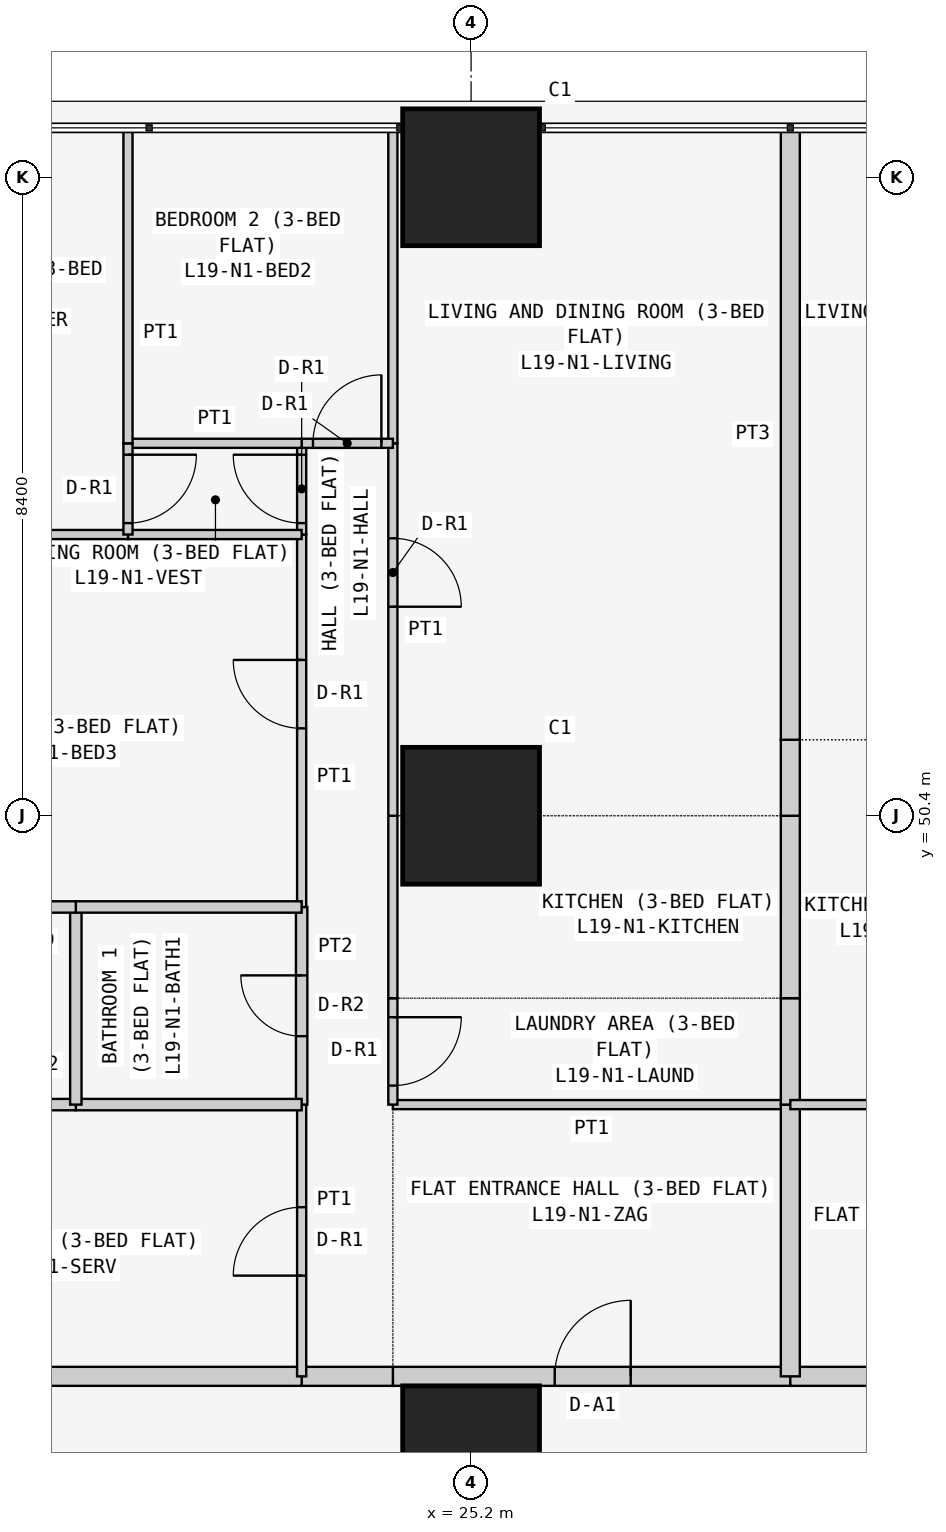
"""IFC4 building model, lengths in metres.
Left out: names, types, materials, properties, quantities, classifications, styles, units other than length and angle.
Written with IfcOpenShell. Run it as: python <this file> out.ifc"""

import sys

from ifc_helpers import new_model, si_unit, direction, frame, frame_2d, origin, origin_2d, place, context, subcontext, project, spatial, rectangle, extrude, element, fill, save


model = new_model("IFC4")
c1 = context("Model", 3, precision=1e-05, world=origin(), true_north=direction((0.0, 1.0)))
c2 = subcontext(c1, "Body", "Model", "MODEL_VIEW")
j1 = project(units=[si_unit("LENGTHUNIT", "METRE"), si_unit("PLANEANGLEUNIT", "RADIAN")], contexts=[c1])
p1 = place(None, origin())
s1 = spatial("IfcSite", under=j1, at=p1, CompositionType="ELEMENT")
p2 = place(p1, origin())
s2 = spatial("IfcBuilding", under=s1, at=p2, CompositionType="ELEMENT")
p3 = place(p2, frame((0.0, 0.0, 77.7)))
s3 = spatial("IfcBuildingStorey", under=s2, at=p3, CompositionType="ELEMENT", Elevation=77.7)
for number, where, z_axis, x_axis in (
    (1, (25.2, 42.0, 0.0), (0.0, 0.0, 1.0), (1.0, 0.0, 0.0)),
    (2, (25.2, 50.4, 0.0), (0.0, 0.0, 1.0), (1.0, 0.0, 0.0)),
    (3, (25.2, 58.8, 0.0), (0.0, 0.0, 1.0), (1.0, 0.0, 0.0)),
):
    element("IfcColumn", number, at=place(p3, frame(where, z_axis=z_axis, x_axis=x_axis)), inside=s3, PredefinedType="COLUMN", context=c2, shape_type="SweptSolid", body=[
        extrude(rectangle(XDim=1.8, YDim=1.8, at=origin_2d()), origin(), (0.0, 0.0, 1.0), 3.6),
    ])
p4 = place(p3, frame((24.171, 43.025, 0.0), z_axis=(0.0, 0.0, 1.0), x_axis=(1.0, 0.0, 0.0)))
e4 = element("IfcWall", 4, at=p4, inside=s3, PredefinedType="PARTITIONING", context=c2, shape_type="SweptSolid", body=[
    extrude(rectangle(XDim=5.229, YDim=0.25, at=frame_2d((2.615, 0.0))), origin(), (0.0, 0.0, 1.0), 3.45),
])
p5 = place(p4, frame((2.129, 0.0, 0.0)))
e5 = element("IfcOpeningElement", 5, at=p5, cuts=e4, PredefinedType="OPENING", context=c2, shape_type="SweptSolid", body=[
    extrude(rectangle(XDim=1.0, YDim=2.1, at=frame_2d((0.5, 1.05))), frame((0.0, 0.135, 0.0), z_axis=(0.0, -1.0, 0.0), x_axis=(1.0, 0.0, 0.0)), (0.0, 0.0, 1.0), 0.27),
])
p6 = place(p3, frame((22.971, 43.025, 0.0), z_axis=(0.0, 0.0, 1.0), x_axis=(1.0, 0.0, 0.0)))
e6 = element("IfcWall", 6, at=p6, inside=s3, PredefinedType="PARTITIONING", context=c2, shape_type="SweptSolid", body=[
    extrude(rectangle(XDim=1.2, YDim=0.25, at=frame_2d((0.6, 0.0))), origin(), (0.0, 0.0, 1.0), 3.45),
])
p7 = place(p3, frame((16.1, 43.025, 0.0), z_axis=(0.0, 0.0, 1.0), x_axis=(1.0, 0.0, 0.0)))
e7 = element("IfcWall", 7, at=p7, inside=s3, PredefinedType="PARTITIONING", context=c2, shape_type="SweptSolid", body=[
    extrude(rectangle(XDim=6.871, YDim=0.25, at=frame_2d((3.436, 0.0))), origin(), (0.0, 0.0, 1.0), 3.45),
])
p8 = place(p3, frame((29.4, 43.025, 0.0), z_axis=(0.0, 0.0, 1.0), x_axis=(1.0, 0.0, 0.0)))
e8 = element("IfcWall", 8, at=p8, inside=s3, PredefinedType="PARTITIONING", context=c2, shape_type="SweptSolid", body=[
    extrude(rectangle(XDim=5.229, YDim=0.25, at=frame_2d((2.615, 0.0))), origin(), (0.0, 0.0, 1.0), 3.45),
])
p9 = place(p8, frame((2.1, 0.0, 0.0)))
e9 = element("IfcOpeningElement", 9, at=p9, cuts=e8, PredefinedType="OPENING", context=c2, shape_type="SweptSolid", body=[
    extrude(rectangle(XDim=1.0, YDim=2.1, at=frame_2d((0.5, 1.05))), frame((0.0, 0.135, 0.0), z_axis=(0.0, -1.0, 0.0), x_axis=(1.0, 0.0, 0.0)), (0.0, 0.0, 1.0), 0.27),
])
p10 = place(p3, frame((29.4, 46.6, 0.0), z_axis=(0.0, 0.0, 1.0), x_axis=(-1.0, 0.0, 0.0)))
e10 = element("IfcWall", 10, at=p10, inside=s3, PredefinedType="PARTITIONING", context=c2, shape_type="SweptSolid", body=[
    extrude(rectangle(XDim=5.229, YDim=0.12, at=frame_2d((2.615, 0.0))), origin(), (0.0, 0.0, 1.0), 3.45),
])
p11 = place(p3, frame((29.4, 43.025, 0.0), z_axis=(0.0, 0.0, 1.0), x_axis=(0.0, 1.0, 0.0)))
e11 = element("IfcWall", 11, at=p11, inside=s3, PredefinedType="PARTITIONING", context=c2, shape_type="SweptSolid", body=[
    extrude(rectangle(XDim=3.575, YDim=0.25, at=frame_2d((1.788, 0.0))), origin(), (0.0, 0.0, 1.0), 2.848),
])
p12 = place(p3, frame((24.171, 48.0, 0.0), z_axis=(0.0, 0.0, 1.0), x_axis=(0.0, -1.0, 0.0)))
e12 = element("IfcWall", 12, at=p12, inside=s3, PredefinedType="PARTITIONING", context=c2, shape_type="SweptSolid", body=[
    extrude(rectangle(XDim=1.4, YDim=0.12, at=frame_2d((0.7, 0.0))), origin(), (0.0, 0.0, 1.0), 3.45),
])
p13 = place(p12, frame((0.25, 0.0, 0.0)))
e13 = element("IfcOpeningElement", 13, at=p13, cuts=e12, PredefinedType="OPENING", context=c2, shape_type="SweptSolid", body=[
    extrude(rectangle(XDim=0.9, YDim=2.1, at=frame_2d((0.45, 1.05))), frame((0.0, 0.07, 0.0), z_axis=(0.0, -1.0, 0.0), x_axis=(1.0, 0.0, 0.0)), (0.0, 0.0, 1.0), 0.14),
])
p14 = place(p3, frame((29.4, 46.6, 0.0), z_axis=(0.0, 0.0, 1.0), x_axis=(0.0, 1.0, 0.0)))
e14 = element("IfcWall", 14, at=p14, inside=s3, PredefinedType="PARTITIONING", context=c2, shape_type="SweptSolid", body=[
    extrude(rectangle(XDim=1.4, YDim=0.25, at=frame_2d((0.7, 0.0))), origin(), (0.0, 0.0, 1.0), 2.848),
])
p15 = place(p3, frame((24.171, 50.4, 0.0), z_axis=(0.0, 0.0, 1.0), x_axis=(0.0, -1.0, 0.0)))
e15 = element("IfcWall", 15, at=p15, inside=s3, PredefinedType="PARTITIONING", context=c2, shape_type="SweptSolid", body=[
    extrude(rectangle(XDim=2.4, YDim=0.12, at=frame_2d((1.2, 0.0))), origin(), (0.0, 0.0, 1.0), 3.45),
])
p16 = place(p3, frame((29.4, 48.0, 0.0), z_axis=(0.0, 0.0, 1.0), x_axis=(0.0, 1.0, 0.0)))
e16 = element("IfcWall", 16, at=p16, inside=s3, PredefinedType="PARTITIONING", context=c2, shape_type="SweptSolid", body=[
    extrude(rectangle(XDim=2.4, YDim=0.25, at=frame_2d((1.2, 0.0))), origin(), (0.0, 0.0, 1.0), 2.848),
])
p17 = place(p3, frame((24.171, 55.3, 0.0), z_axis=(0.0, 0.0, 1.0), x_axis=(0.0, -1.0, 0.0)))
e17 = element("IfcWall", 17, at=p17, inside=s3, PredefinedType="PARTITIONING", context=c2, shape_type="SweptSolid", body=[
    extrude(rectangle(XDim=4.9, YDim=0.12, at=frame_2d((2.45, 0.0))), origin(), (0.0, 0.0, 1.0), 3.45),
])
p18 = place(p17, frame((1.25, 0.0, 0.0)))
e18 = element("IfcOpeningElement", 18, at=p18, cuts=e17, PredefinedType="OPENING", context=c2, shape_type="SweptSolid", body=[
    extrude(rectangle(XDim=0.9, YDim=2.1, at=frame_2d((0.45, 1.05))), frame((0.0, 0.07, 0.0), z_axis=(0.0, -1.0, 0.0), x_axis=(1.0, 0.0, 0.0)), (0.0, 0.0, 1.0), 0.14),
])
p19 = place(p3, frame((24.171, 59.45, 0.0), z_axis=(0.0, 0.0, 1.0), x_axis=(0.0, -1.0, 0.0)))
e19 = element("IfcWall", 19, at=p19, inside=s3, PredefinedType="PARTITIONING", context=c2, shape_type="SweptSolid", body=[
    extrude(rectangle(XDim=4.15, YDim=0.12, at=frame_2d((2.075, 0.0))), origin(), (0.0, 0.0, 1.0), 3.45),
])
p20 = place(p3, frame((29.4, 50.4, 0.0), z_axis=(0.0, 0.0, 1.0), x_axis=(0.0, 1.0, 0.0)))
e20 = element("IfcWall", 20, at=p20, inside=s3, PredefinedType="PARTITIONING", context=c2, shape_type="SweptSolid", body=[
    extrude(rectangle(XDim=1.0, YDim=0.25, at=frame_2d((0.5, 0.0))), origin(), (0.0, 0.0, 1.0), 2.848),
])
p21 = place(p3, frame((29.4, 51.4, 0.0), z_axis=(0.0, 0.0, 1.0), x_axis=(0.0, 1.0, 0.0)))
e21 = element("IfcWall", 21, at=p21, inside=s3, PredefinedType="PARTITIONING", context=c2, shape_type="SweptSolid", body=[
    extrude(rectangle(XDim=8.05, YDim=0.25, at=frame_2d((4.025, 0.0))), origin(), (0.0, 0.0, 1.0), 2.848),
])
p22 = place(p3, frame((22.971, 46.6, 0.0), z_axis=(0.0, 0.0, 1.0), x_axis=(0.0, -1.0, 0.0)))
e22 = element("IfcWall", 22, at=p22, inside=s3, PredefinedType="PARTITIONING", context=c2, shape_type="SweptSolid", body=[
    extrude(rectangle(XDim=3.575, YDim=0.12, at=frame_2d((1.788, 0.0))), origin(), (0.0, 0.0, 1.0), 3.45),
])
p23 = place(p22, frame((1.35, 0.0, 0.0)))
e23 = element("IfcOpeningElement", 23, at=p23, cuts=e22, PredefinedType="OPENING", context=c2, shape_type="SweptSolid", body=[
    extrude(rectangle(XDim=0.9, YDim=2.1, at=frame_2d((0.45, 1.05))), frame((0.0, 0.07, 0.0), z_axis=(0.0, -1.0, 0.0), x_axis=(1.0, 0.0, 0.0)), (0.0, 0.0, 1.0), 0.14),
])
p24 = place(p3, frame((22.971, 49.2, 0.0), z_axis=(0.0, 0.0, 1.0), x_axis=(0.0, -1.0, 0.0)))
e24 = element("IfcWall", 24, at=p24, inside=s3, PredefinedType="PARTITIONING", context=c2, shape_type="SweptSolid", body=[
    extrude(rectangle(XDim=2.6, YDim=0.15, at=frame_2d((1.3, 0.0))), origin(), (0.0, 0.0, 1.0), 3.45),
])
p25 = place(p24, frame((0.9, 0.0, 0.0)))
e25 = element("IfcOpeningElement", 25, at=p25, cuts=e24, PredefinedType="OPENING", context=c2, shape_type="SweptSolid", body=[
    extrude(rectangle(XDim=0.8, YDim=2.1, at=frame_2d((0.4, 1.05))), frame((0.0, 0.085, 0.0), z_axis=(0.0, -1.0, 0.0), x_axis=(1.0, 0.0, 0.0)), (0.0, 0.0, 1.0), 0.17),
])
p26 = place(p3, frame((22.971, 54.1, 0.0), z_axis=(0.0, 0.0, 1.0), x_axis=(0.0, -1.0, 0.0)))
e26 = element("IfcWall", 26, at=p26, inside=s3, PredefinedType="PARTITIONING", context=c2, shape_type="SweptSolid", body=[
    extrude(rectangle(XDim=4.9, YDim=0.12, at=frame_2d((2.45, 0.0))), origin(), (0.0, 0.0, 1.0), 3.45),
])
p27 = place(p26, frame((1.65, 0.0, 0.0)))
e27 = element("IfcOpeningElement", 27, at=p27, cuts=e26, PredefinedType="OPENING", context=c2, shape_type="SweptSolid", body=[
    extrude(rectangle(XDim=0.9, YDim=2.1, at=frame_2d((0.45, 1.05))), frame((0.0, 0.07, 0.0), z_axis=(0.0, -1.0, 0.0), x_axis=(1.0, 0.0, 0.0)), (0.0, 0.0, 1.0), 0.14),
])
p28 = place(p3, frame((22.971, 55.3, 0.0), z_axis=(0.0, 0.0, 1.0), x_axis=(0.0, -1.0, 0.0)))
e28 = element("IfcWall", 28, at=p28, inside=s3, PredefinedType="PARTITIONING", context=c2, shape_type="SweptSolid", body=[
    extrude(rectangle(XDim=1.2, YDim=0.12, at=frame_2d((0.6, 0.0))), origin(), (0.0, 0.0, 1.0), 3.45),
])
p29 = place(p28, frame((0.15, 0.0, 0.0)))
e29 = element("IfcOpeningElement", 29, at=p29, cuts=e28, PredefinedType="OPENING", context=c2, shape_type="SweptSolid", body=[
    extrude(rectangle(XDim=0.9, YDim=2.1, at=frame_2d((0.45, 1.05))), frame((0.0, 0.07, 0.0), z_axis=(0.0, -1.0, 0.0), x_axis=(1.0, 0.0, 0.0)), (0.0, 0.0, 1.0), 0.14),
])
p30 = place(p3, frame((24.171, 55.3, 0.0), z_axis=(0.0, 0.0, 1.0), x_axis=(-1.0, 0.0, 0.0)))
e30 = element("IfcWall", 30, at=p30, inside=s3, PredefinedType="PARTITIONING", context=c2, shape_type="SweptSolid", body=[
    extrude(rectangle(XDim=1.2, YDim=0.12, at=frame_2d((0.6, 0.0))), origin(), (0.0, 0.0, 1.0), 3.45),
])
p31 = place(p30, frame((0.151, 0.0, 0.0)))
e31 = element("IfcOpeningElement", 31, at=p31, cuts=e30, PredefinedType="OPENING", context=c2, shape_type="SweptSolid", body=[
    extrude(rectangle(XDim=0.9, YDim=2.1, at=frame_2d((0.45, 1.05))), frame((0.0, 0.07, 0.0), z_axis=(0.0, -1.0, 0.0), x_axis=(1.0, 0.0, 0.0)), (0.0, 0.0, 1.0), 0.14),
])
p32 = place(p3, frame((22.971, 46.6, 0.0), z_axis=(0.0, 0.0, 1.0), x_axis=(-1.0, 0.0, 0.0)))
e32 = element("IfcWall", 32, at=p32, inside=s3, PredefinedType="PARTITIONING", context=c2, shape_type="SweptSolid", body=[
    extrude(rectangle(XDim=2.971, YDim=0.15, at=frame_2d((1.485, 0.0))), origin(), (0.0, 0.0, 1.0), 3.45),
])
p33 = place(p3, frame((20.0, 46.6, 0.0), z_axis=(0.0, 0.0, 1.0), x_axis=(-1.0, 0.0, 0.0)))
e33 = element("IfcWall", 33, at=p33, inside=s3, PredefinedType="PARTITIONING", context=c2, shape_type="SweptSolid", body=[
    extrude(rectangle(XDim=3.9, YDim=0.15, at=frame_2d((1.95, 0.0))), origin(), (0.0, 0.0, 1.0), 3.45),
])
p34 = place(p33, frame((1.45, 0.0, 0.0)))
e34 = element("IfcOpeningElement", 34, at=p34, cuts=e33, PredefinedType="OPENING", context=c2, shape_type="SweptSolid", body=[
    extrude(rectangle(XDim=0.8, YDim=2.1, at=frame_2d((0.4, 1.05))), frame((0.0, 0.085, 0.0), z_axis=(0.0, -1.0, 0.0), x_axis=(1.0, 0.0, 0.0)), (0.0, 0.0, 1.0), 0.17),
])
p35 = place(p3, frame((20.0, 49.2, 0.0), z_axis=(0.0, 0.0, 1.0), x_axis=(0.0, -1.0, 0.0)))
e35 = element("IfcWall", 35, at=p35, inside=s3, PredefinedType="PARTITIONING", context=c2, shape_type="SweptSolid", body=[
    extrude(rectangle(XDim=2.6, YDim=0.15, at=frame_2d((1.3, 0.0))), origin(), (0.0, 0.0, 1.0), 3.45),
])
p36 = place(p3, frame((22.971, 49.2, 0.0), z_axis=(0.0, 0.0, 1.0), x_axis=(-1.0, 0.0, 0.0)))
e36 = element("IfcWall", 36, at=p36, inside=s3, PredefinedType="PARTITIONING", context=c2, shape_type="SweptSolid", body=[
    extrude(rectangle(XDim=2.971, YDim=0.15, at=frame_2d((1.485, 0.0))), origin(), (0.0, 0.0, 1.0), 3.45),
])
p37 = place(p3, frame((20.0, 49.2, 0.0), z_axis=(0.0, 0.0, 1.0), x_axis=(-1.0, 0.0, 0.0)))
e37 = element("IfcWall", 37, at=p37, inside=s3, PredefinedType="PARTITIONING", context=c2, shape_type="SweptSolid", body=[
    extrude(rectangle(XDim=3.9, YDim=0.15, at=frame_2d((1.95, 0.0))), origin(), (0.0, 0.0, 1.0), 3.45),
])
p38 = place(p3, frame((22.971, 54.1, 0.0), z_axis=(0.0, 0.0, 1.0), x_axis=(-1.0, 0.0, 0.0)))
e38 = element("IfcWall", 38, at=p38, inside=s3, PredefinedType="PARTITIONING", context=c2, shape_type="SweptSolid", body=[
    extrude(rectangle(XDim=2.285, YDim=0.12, at=frame_2d((1.143, 0.0))), origin(), (0.0, 0.0, 1.0), 3.45),
])
p39 = place(p3, frame((20.686, 54.1, 0.0), z_axis=(0.0, 0.0, 1.0), x_axis=(-1.0, 0.0, 0.0)))
e39 = element("IfcWall", 39, at=p39, inside=s3, PredefinedType="PARTITIONING", context=c2, shape_type="SweptSolid", body=[
    extrude(rectangle(XDim=4.586, YDim=0.12, at=frame_2d((2.293, 0.0))), origin(), (0.0, 0.0, 1.0), 3.45),
])
p40 = place(p3, frame((22.971, 55.3, 0.0), z_axis=(0.0, 0.0, 1.0), x_axis=(-1.0, 0.0, 0.0)))
e40 = element("IfcWall", 40, at=p40, inside=s3, PredefinedType="PARTITIONING", context=c2, shape_type="SweptSolid", body=[
    extrude(rectangle(XDim=2.285, YDim=0.12, at=frame_2d((1.143, 0.0))), origin(), (0.0, 0.0, 1.0), 3.45),
])
p41 = place(p3, frame((20.686, 55.3, 0.0), z_axis=(0.0, 0.0, 1.0), x_axis=(0.0, -1.0, 0.0)))
e41 = element("IfcWall", 41, at=p41, inside=s3, PredefinedType="PARTITIONING", context=c2, shape_type="SweptSolid", body=[
    extrude(rectangle(XDim=1.2, YDim=0.12, at=frame_2d((0.6, 0.0))), origin(), (0.0, 0.0, 1.0), 3.45),
])
p42 = place(p41, frame((0.15, 0.0, 0.0)))
e42 = element("IfcOpeningElement", 42, at=p42, cuts=e41, PredefinedType="OPENING", context=c2, shape_type="SweptSolid", body=[
    extrude(rectangle(XDim=0.9, YDim=2.1, at=frame_2d((0.45, 1.05))), frame((0.0, 0.07, 0.0), z_axis=(0.0, -1.0, 0.0), x_axis=(1.0, 0.0, 0.0)), (0.0, 0.0, 1.0), 0.14),
])
p43 = place(p3, frame((20.686, 59.45, 0.0), z_axis=(0.0, 0.0, 1.0), x_axis=(0.0, -1.0, 0.0)))
e43 = element("IfcWall", 43, at=p43, inside=s3, PredefinedType="PARTITIONING", context=c2, shape_type="SweptSolid", body=[
    extrude(rectangle(XDim=4.15, YDim=0.12, at=frame_2d((2.075, 0.0))), origin(), (0.0, 0.0, 1.0), 3.45),
])
p44 = place(p3, frame((29.4, 46.6, 0.0), z_axis=(0.0, 0.0, 1.0), x_axis=(1.0, 0.0, 0.0)))
e44 = element("IfcWall", 44, at=p44, inside=s3, PredefinedType="PARTITIONING", context=c2, shape_type="SweptSolid", body=[
    extrude(rectangle(XDim=5.229, YDim=0.12, at=frame_2d((2.615, 0.0))), origin(), (0.0, 0.0, 1.0), 3.45),
])
p45 = place(p44, frame((1.05, 0.0, 0.0)))
e45 = element("IfcOpeningElement", 45, at=p45, cuts=e44, PredefinedType="OPENING", context=c2, shape_type="SweptSolid", body=[
    extrude(rectangle(XDim=0.9, YDim=2.1, at=frame_2d((0.45, 1.05))), frame((0.0, 0.07, 0.0), z_axis=(0.0, -1.0, 0.0), x_axis=(1.0, 0.0, 0.0)), (0.0, 0.0, 1.0), 0.14),
])
p46 = place(p5, origin())
e46 = element("IfcDoor", 46, at=p46, inside=s3, OperationType="SINGLE_SWING_RIGHT", PredefinedType="DOOR", context=c2, shape_type="SweptSolid", body=[
    extrude(rectangle(XDim=1.0, YDim=2.1, at=frame_2d((0.5, 1.05))), frame((0.0, 0.025, 0.0), z_axis=(0.0, -1.0, 0.0), x_axis=(1.0, 0.0, 0.0)), (0.0, 0.0, 1.0), 0.05),
])
fill(e5, e46)
p47 = place(p13, origin())
e47 = element("IfcDoor", 47, at=p47, inside=s3, OperationType="SINGLE_SWING_LEFT", PredefinedType="DOOR", context=c2, shape_type="SweptSolid", body=[
    extrude(rectangle(XDim=0.9, YDim=2.1, at=frame_2d((0.45, 1.05))), frame((0.0, 0.025, 0.0), z_axis=(0.0, -1.0, 0.0), x_axis=(1.0, 0.0, 0.0)), (0.0, 0.0, 1.0), 0.05),
])
fill(e13, e47)
p48 = place(p18, origin())
e48 = element("IfcDoor", 48, at=p48, inside=s3, OperationType="SINGLE_SWING_RIGHT", PredefinedType="DOOR", context=c2, shape_type="SweptSolid", body=[
    extrude(rectangle(XDim=0.9, YDim=2.1, at=frame_2d((0.45, 1.05))), frame((0.0, 0.025, 0.0), z_axis=(0.0, -1.0, 0.0), x_axis=(1.0, 0.0, 0.0)), (0.0, 0.0, 1.0), 0.05),
])
fill(e18, e48)
p49 = place(p23, frame((0.9, 0.0, 0.0), z_axis=(0.0, 0.0, 1.0), x_axis=(-1.0, 0.0, 0.0)))
e49 = element("IfcDoor", 49, at=p49, inside=s3, OperationType="SINGLE_SWING_LEFT", PredefinedType="DOOR", context=c2, shape_type="SweptSolid", body=[
    extrude(rectangle(XDim=0.9, YDim=2.1, at=frame_2d((0.45, 1.05))), frame((0.0, 0.025, 0.0), z_axis=(0.0, -1.0, 0.0), x_axis=(1.0, 0.0, 0.0)), (0.0, 0.0, 1.0), 0.05),
])
fill(e23, e49)
p50 = place(p25, frame((0.8, 0.0, 0.0), z_axis=(0.0, 0.0, 1.0), x_axis=(-1.0, 0.0, 0.0)))
e50 = element("IfcDoor", 50, at=p50, inside=s3, OperationType="SINGLE_SWING_RIGHT", PredefinedType="DOOR", context=c2, shape_type="SweptSolid", body=[
    extrude(rectangle(XDim=0.8, YDim=2.1, at=frame_2d((0.4, 1.05))), frame((0.0, 0.025, 0.0), z_axis=(0.0, -1.0, 0.0), x_axis=(1.0, 0.0, 0.0)), (0.0, 0.0, 1.0), 0.05),
])
fill(e25, e50)
p51 = place(p27, frame((0.9, 0.0, 0.0), z_axis=(0.0, 0.0, 1.0), x_axis=(-1.0, 0.0, 0.0)))
e51 = element("IfcDoor", 51, at=p51, inside=s3, OperationType="SINGLE_SWING_RIGHT", PredefinedType="DOOR", context=c2, shape_type="SweptSolid", body=[
    extrude(rectangle(XDim=0.9, YDim=2.1, at=frame_2d((0.45, 1.05))), frame((0.0, 0.025, 0.0), z_axis=(0.0, -1.0, 0.0), x_axis=(1.0, 0.0, 0.0)), (0.0, 0.0, 1.0), 0.05),
])
fill(e27, e51)
p52 = place(p29, frame((0.9, 0.0, 0.0), z_axis=(0.0, 0.0, 1.0), x_axis=(-1.0, 0.0, 0.0)))
e52 = element("IfcDoor", 52, at=p52, inside=s3, OperationType="SINGLE_SWING_RIGHT", PredefinedType="DOOR", context=c2, shape_type="SweptSolid", body=[
    extrude(rectangle(XDim=0.9, YDim=2.1, at=frame_2d((0.45, 1.05))), frame((0.0, 0.025, 0.0), z_axis=(0.0, -1.0, 0.0), x_axis=(1.0, 0.0, 0.0)), (0.0, 0.0, 1.0), 0.05),
])
fill(e29, e52)
p53 = place(p42, origin())
e53 = element("IfcDoor", 53, at=p53, inside=s3, OperationType="SINGLE_SWING_LEFT", PredefinedType="DOOR", context=c2, shape_type="SweptSolid", body=[
    extrude(rectangle(XDim=0.9, YDim=2.1, at=frame_2d((0.45, 1.05))), frame((0.0, 0.025, 0.0), z_axis=(0.0, -1.0, 0.0), x_axis=(1.0, 0.0, 0.0)), (0.0, 0.0, 1.0), 0.05),
])
fill(e42, e53)
p54 = place(p31, frame((0.9, 0.0, 0.0), z_axis=(0.0, 0.0, 1.0), x_axis=(-1.0, 0.0, 0.0)))
e54 = element("IfcDoor", 54, at=p54, inside=s3, OperationType="SINGLE_SWING_RIGHT", PredefinedType="DOOR", context=c2, shape_type="SweptSolid", body=[
    extrude(rectangle(XDim=0.9, YDim=2.1, at=frame_2d((0.45, 1.05))), frame((0.0, 0.025, 0.0), z_axis=(0.0, -1.0, 0.0), x_axis=(1.0, 0.0, 0.0)), (0.0, 0.0, 1.0), 0.05),
])
fill(e31, e54)
save(model, sys.argv[1])
